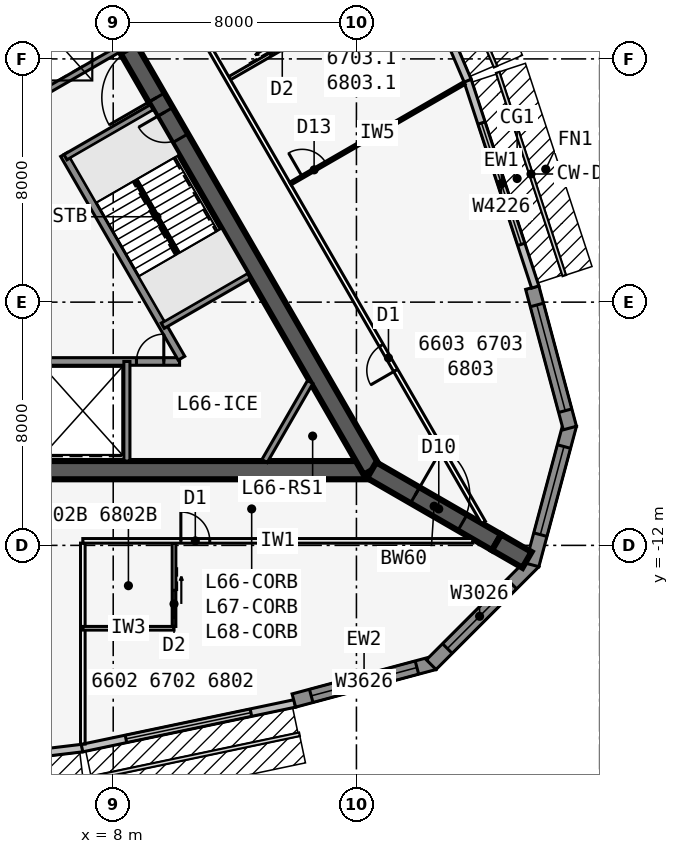
"""IFC4 building model, lengths in metres.
Left out: names, types, materials, properties, quantities, classifications, styles, units other than length and angle.
Written with IfcOpenShell. Run it as: python <this file> out.ifc"""

import sys

from ifc_helpers import new_model, si_unit, direction, frame, frame_2d, origin, place, context, subcontext, project, spatial, polyline, rectangle, outline, extrude, element, fill, save


model = new_model("IFC4")
c1 = context("Model", 3, precision=1e-05, world=origin(), true_north=direction((0.0, 1.0)))
c2 = subcontext(c1, "Body", "Model", "MODEL_VIEW")
j1 = project(units=[si_unit("LENGTHUNIT", "METRE"), si_unit("PLANEANGLEUNIT", "RADIAN")], contexts=[c1])
p1 = place(None, origin())
s1 = spatial("IfcSite", under=j1, at=p1, CompositionType="ELEMENT")
p2 = place(p1, origin())
s2 = spatial("IfcBuilding", under=s1, at=p2, CompositionType="ELEMENT")
p3 = place(p2, frame((0.0, 0.0, 250.1)))
s3 = spatial("IfcBuildingStorey", under=s2, at=p3, CompositionType="ELEMENT", Elevation=250.1)
p4 = place(p3, frame((-16.5, -9.526, 0.0), z_axis=(0.0, 0.0, 1.0), x_axis=(1.0, 0.0, 0.0)))
e1 = element("IfcWall", 1, at=p4, inside=s3, PredefinedType="SHEAR", context=c2, shape_type="SweptSolid", body=[
    extrude(rectangle(XDim=33.0, YDim=0.6, at=frame_2d((16.5, 0.0))), origin(), (0.0, 0.0, 1.0), 3.6),
])
p5 = place(p4, frame((14.05, 0.0, 0.0)))
e2 = element("IfcOpeningElement", 2, at=p5, cuts=e1, PredefinedType="OPENING", context=c2, shape_type="SweptSolid", body=[
    extrude(rectangle(XDim=1.8, YDim=2.13, at=frame_2d((0.9, 1.065))), frame((0.0, 0.31, 0.0), z_axis=(0.0, -1.0, 0.0), x_axis=(1.0, 0.0, 0.0)), (0.0, 0.0, 1.0), 0.62),
])
p6 = place(p3, frame((-0.55, -5.951, 0.0), z_axis=(0.0, 0.0, 1.0), x_axis=(1.0, 0.0, 0.0)))
e3 = element("IfcWall", 3, at=p6, inside=s3, PredefinedType="SOLIDWALL", context=c2, shape_type="SweptSolid", body=[
    extrude(rectangle(XDim=10.733, YDim=0.25, at=frame_2d((5.366, 0.0))), origin(), (0.0, 0.0, 1.0), 3.435),
])
p7 = place(p6, frame((9.314, 0.0, 0.0)))
e4 = element("IfcOpeningElement", 4, at=p7, cuts=e3, PredefinedType="OPENING", context=c2, shape_type="SweptSolid", body=[
    extrude(rectangle(XDim=0.9, YDim=2.13, at=frame_2d((0.45, 1.065))), frame((0.0, 0.135, 0.0), z_axis=(0.0, -1.0, 0.0), x_axis=(1.0, 0.0, 0.0)), (0.0, 0.0, 1.0), 0.27),
])
p8 = place(p6, frame((1.05, 0.0, 0.0)))
e5 = element("IfcOpeningElement", 5, at=p8, cuts=e3, PredefinedType="OPENING", context=c2, shape_type="SweptSolid", body=[
    extrude(rectangle(XDim=1.1, YDim=2.13, at=frame_2d((0.55, 1.065))), frame((0.0, 0.135, 0.0), z_axis=(0.0, -1.0, 0.0), x_axis=(1.0, 0.0, 0.0)), (0.0, 0.0, 1.0), 0.27),
])
p9 = place(p6, frame((4.05, 0.0, 0.0)))
e6 = element("IfcOpeningElement", 6, at=p9, cuts=e3, PredefinedType="OPENING", context=c2, shape_type="SweptSolid", body=[
    extrude(rectangle(XDim=1.1, YDim=2.13, at=frame_2d((0.55, 1.065))), frame((0.0, 0.135, 0.0), z_axis=(0.0, -1.0, 0.0), x_axis=(1.0, 0.0, 0.0)), (0.0, 0.0, 1.0), 0.27),
])
p10 = place(p3, frame((8.45, -5.951, 0.0), z_axis=(0.0, 0.0, 1.0), x_axis=(0.0, -1.0, 0.0)))
e7 = element("IfcWall", 7, at=p10, inside=s3, PredefinedType="SOLIDWALL", context=c2, shape_type="SweptSolid", body=[
    extrude(rectangle(XDim=3.275, YDim=0.2, at=frame_2d((1.637, 0.0))), origin(), (0.0, 0.0, 1.0), 3.435),
])
p11 = place(p3, frame((16.5, -9.526, 0.0), z_axis=(0.0, 0.0, 1.0), x_axis=(-0.499999749417, 0.866025548458, 0.0)))
e8 = element("IfcWall", 8, at=p11, inside=s3, PredefinedType="SHEAR", context=c2, shape_type="SweptSolid", body=[
    extrude(rectangle(XDim=33.0, YDim=0.6, at=frame_2d((16.5, 0.0))), origin(), (0.0, 0.0, 1.0), 3.6),
])
p12 = place(p11, frame((14.15, 0.0, 0.0)))
e9 = element("IfcOpeningElement", 9, at=p12, cuts=e8, PredefinedType="OPENING", context=c2, shape_type="SweptSolid", body=[
    extrude(rectangle(XDim=1.8, YDim=2.13, at=frame_2d((0.9, 1.065))), frame((0.0, 0.31, 0.0), z_axis=(0.0, -1.0, 0.0), x_axis=(1.0, 0.0, 0.0)), (0.0, 0.0, 1.0), 0.62),
])
p13 = place(p11, frame((12.6, 0.0, 0.0)))
e10 = element("IfcOpeningElement", 10, at=p13, cuts=e8, PredefinedType="OPENING", context=c2, shape_type="SweptSolid", body=[
    extrude(rectangle(XDim=1.0, YDim=2.13, at=frame_2d((0.5, 1.065))), frame((0.0, 0.31, 0.0), z_axis=(0.0, -1.0, 0.0), x_axis=(1.0, 0.0, 0.0)), (0.0, 0.0, 1.0), 0.62),
])
p14 = place(p3, frame((10.245, -5.843, 0.0), z_axis=(0.0, 0.0, 1.0), x_axis=(-0.499993009313, 0.866029439822, 0.0)))
e11 = element("IfcWall", 11, at=p14, inside=s3, PredefinedType="SOLIDWALL", context=c2, shape_type="SweptSolid", body=[
    extrude(rectangle(XDim=7.733, YDim=0.25, at=frame_2d((3.866, 0.0))), origin(), (0.0, 0.0, 1.0), 3.435),
])
p15 = place(p3, frame((9.629, -4.775, 0.0), z_axis=(0.0, 0.0, 1.0), x_axis=(0.865995643347, 0.500051543047, 0.0)))
e12 = element("IfcWall", 12, at=p15, inside=s3, PredefinedType="SOLIDWALL", context=c2, shape_type="SweptSolid", body=[
    extrude(rectangle(XDim=3.275, YDim=0.2, at=frame_2d((1.638, 0.0))), origin(), (0.0, 0.0, 1.0), 3.435),
])
for number, where, z_axis, x_axis in (
    (13, (6.429, 0.767, 0.0), (0.0, 0.0, 1.0), (0.866, 0.5, 0.0)),
    (14, (5.329, 2.673, 0.0), (0.0, 0.0, 1.0), (0.866, 0.5, 0.0)),
):
    element("IfcWall", number, at=place(p3, frame(where, z_axis=z_axis, x_axis=x_axis)), inside=s3, PredefinedType="SOLIDWALL", context=c2, shape_type="SweptSolid", body=[
        extrude(rectangle(XDim=3.275, YDim=0.2, at=frame_2d((1.637, 0.0))), origin(), (0.0, 0.0, 1.0), 3.435),
    ])
p16 = place(p3, frame((16.5, -9.526, 0.0), z_axis=(0.0, 0.0, 1.0), x_axis=(0.866031398331, -0.499989616998, 0.0)))
e15 = element("IfcWall", 15, at=p16, inside=s3, PredefinedType="SHEAR", context=c2, shape_type="SweptSolid", body=[
    extrude(rectangle(XDim=4.746, YDim=0.6, at=frame_2d((2.373, 0.0))), origin(), (0.0, 0.0, 1.0), 3.6),
])
p17 = place(p16, frame((1.65, 0.0, 0.0)))
e16 = element("IfcOpeningElement", 16, at=p17, cuts=e15, PredefinedType="OPENING", context=c2, shape_type="SweptSolid", body=[
    extrude(rectangle(XDim=1.8, YDim=2.13, at=frame_2d((0.9, 1.065))), frame((0.0, 0.31, 0.0), z_axis=(0.0, -1.0, 0.0), x_axis=(1.0, 0.0, 0.0)), (0.0, 0.0, 1.0), 0.62),
])
p18 = place(p3, frame((20.61, -11.899, 0.0), z_axis=(0.0, 0.0, 1.0), x_axis=(0.866009537788, -0.500027479704, 0.0)))
e17 = element("IfcWall", 17, at=p18, inside=s3, PredefinedType="SHEAR", context=c2, shape_type="SweptSolid", body=[
    extrude(rectangle(XDim=1.155, YDim=0.6, at=frame_2d((0.577, 0.0))), origin(), (0.0, 0.0, 1.0), 3.6),
])
p19 = place(p3, frame((4.985, -18.906, 0.0), z_axis=(0.0, 0.0, 1.0), x_axis=(0.992877411981, 0.119140441403, 0.0)))
e18 = element("IfcWall", 18, at=p19, inside=s3, PredefinedType="STANDARD", context=c2, shape_type="SweptSolid", body=[
    extrude(rectangle(XDim=2.014, YDim=0.25, at=frame_2d((1.007, 0.0))), origin(), (0.0, 0.0, 1.0), 3.435),
])
p20 = place(p3, frame((6.974, -18.668, 0.0), z_axis=(0.0, 0.0, 1.0), x_axis=(0.978654320409, 0.205513311355, 0.0)))
e19 = element("IfcWall", 19, at=p20, inside=s3, PredefinedType="STANDARD", context=c2, shape_type="SweptSolid", body=[
    extrude(rectangle(XDim=7.153, YDim=0.25, at=frame_2d((3.576, 0.0))), origin(), (0.0, 0.0, 1.0), 3.435),
])
p21 = place(p20, frame((1.476, 0.0, 0.45)))
e20 = element("IfcOpeningElement", 20, at=p21, cuts=e19, PredefinedType="OPENING", context=c2, shape_type="SweptSolid", body=[
    extrude(rectangle(XDim=4.2, YDim=2.6, at=frame_2d((2.1, 1.3))), frame((0.0, 0.135, 0.0), z_axis=(0.0, -1.0, 0.0), x_axis=(1.0, 0.0, 0.0)), (0.0, 0.0, 1.0), 0.27),
])
p22 = place(p3, frame((13.942, -17.103, 0.0), z_axis=(0.0, 0.0, 1.0), x_axis=(0.965913862671, 0.258863689806, 0.0)))
e21 = element("IfcWall", 21, at=p22, inside=s3, PredefinedType="SOLIDWALL", context=c2, shape_type="SweptSolid", body=[
    extrude(rectangle(XDim=4.782, YDim=0.45, at=frame_2d((2.391, 0.0))), origin(), (0.0, 0.0, 1.0), 3.435),
])
p23 = place(p22, frame((0.591, 0.0, 0.45)))
e22 = element("IfcOpeningElement", 22, at=p23, cuts=e21, PredefinedType="OPENING", context=c2, shape_type="SweptSolid", body=[
    extrude(rectangle(XDim=3.6, YDim=2.6, at=frame_2d((1.8, 1.3))), frame((0.0, 0.235, 0.0), z_axis=(0.0, -1.0, 0.0), x_axis=(1.0, 0.0, 0.0)), (0.0, 0.0, 1.0), 0.47),
])
p24 = place(p3, frame((18.46, -15.924, 0.0), z_axis=(0.0, 0.0, 1.0), x_axis=(0.707081252484, 0.707132308968, 0.0)))
e23 = element("IfcWall", 23, at=p24, inside=s3, PredefinedType="SOLIDWALL", context=c2, shape_type="SweptSolid", body=[
    extrude(outline(polyline([(4.782, 0.225), (4.723, 0.225), (4.375, 0.132), (4.351, 0.225), (0.0, 0.225), (0.0, -0.225), (4.782, -0.225), (4.782, 0.225)])), origin(), (0.0, 0.0, 1.0), 3.435),
])
p25 = place(p24, frame((0.75, 0.0, 0.45)))
e24 = element("IfcOpeningElement", 24, at=p25, cuts=e23, PredefinedType="OPENING", context=c2, shape_type="SweptSolid", body=[
    extrude(rectangle(XDim=3.0, YDim=2.6, at=frame_2d((1.5, 1.3))), frame((0.0, 0.235, 0.0), z_axis=(0.0, -1.0, 0.0), x_axis=(1.0, 0.0, 0.0)), (0.0, 0.0, 1.0), 0.47),
])
p26 = place(p3, frame((21.783, -12.644, 0.0), z_axis=(0.0, 0.0, 1.0), x_axis=(0.25880328844, 0.965930048136, 0.0)))
e25 = element("IfcWall", 25, at=p26, inside=s3, PredefinedType="SOLIDWALL", context=c2, shape_type="SweptSolid", body=[
    extrude(outline(polyline([(4.782, 0.225), (0.431, 0.225), (0.406, 0.132), (0.06, 0.225), (0.0, 0.225), (0.0, -0.225), (4.782, -0.225), (4.782, 0.225)])), origin(), (0.0, 0.0, 1.0), 3.435),
])
p27 = place(p26, frame((1.031, 0.0, 0.45)))
e26 = element("IfcOpeningElement", 26, at=p27, cuts=e25, PredefinedType="OPENING", context=c2, shape_type="SweptSolid", body=[
    extrude(rectangle(XDim=3.0, YDim=2.6, at=frame_2d((1.5, 1.3))), frame((0.0, 0.235, 0.0), z_axis=(0.0, -1.0, 0.0), x_axis=(1.0, 0.0, 0.0)), (0.0, 0.0, 1.0), 0.47),
])
p28 = place(p3, frame((23.02, -8.141, 0.0), z_axis=(0.0, 0.0, 1.0), x_axis=(-0.25880328844, 0.965930048136, 0.0)))
e27 = element("IfcWall", 27, at=p28, inside=s3, PredefinedType="SOLIDWALL", context=c2, shape_type="SweptSolid", body=[
    extrude(rectangle(XDim=4.782, YDim=0.45, at=frame_2d((2.391, 0.0))), origin(), (0.0, 0.0, 1.0), 3.435),
])
p29 = place(p28, frame((0.591, 0.0, 0.45)))
e28 = element("IfcOpeningElement", 28, at=p29, cuts=e27, PredefinedType="OPENING", context=c2, shape_type="SweptSolid", body=[
    extrude(rectangle(XDim=3.6, YDim=2.6, at=frame_2d((1.8, 1.3))), frame((0.0, 0.235, 0.0), z_axis=(0.0, -1.0, 0.0), x_axis=(1.0, 0.0, 0.0)), (0.0, 0.0, 1.0), 0.47),
])
p30 = place(p3, frame((21.881, -3.503, 0.0), z_axis=(0.0, 0.0, 1.0), x_axis=(-0.311328857048, 0.95030223759, 0.0)))
e29 = element("IfcWall", 29, at=p30, inside=s3, PredefinedType="STANDARD", context=c2, shape_type="SweptSolid", body=[
    extrude(rectangle(XDim=7.153, YDim=0.25, at=frame_2d((3.576, 0.0))), origin(), (0.0, 0.0, 1.0), 3.435),
])
p31 = place(p30, frame((1.476, 0.0, 0.45)))
e30 = element("IfcOpeningElement", 30, at=p31, cuts=e29, PredefinedType="OPENING", context=c2, shape_type="SweptSolid", body=[
    extrude(rectangle(XDim=4.2, YDim=2.6, at=frame_2d((2.1, 1.3))), frame((0.0, 0.135, 0.0), z_axis=(0.0, -1.0, 0.0), x_axis=(1.0, 0.0, 0.0)), (0.0, 0.0, 1.0), 0.27),
])
p32 = place(p3, frame((19.658, 3.284, 0.0), z_axis=(0.0, 0.0, 1.0), x_axis=(-0.393290226175, 0.91941437774, 0.0)))
e31 = element("IfcWall", 31, at=p32, inside=s3, PredefinedType="STANDARD", context=c2, shape_type="SweptSolid", body=[
    extrude(rectangle(XDim=2.014, YDim=0.25, at=frame_2d((1.007, 0.0))), origin(), (0.0, 0.0, 1.0), 3.435),
])
p33 = place(p3, frame((7.0, -11.851, 0.0), z_axis=(0.0, 0.0, 1.0), x_axis=(1.0, 0.0, 0.0)))
e32 = element("IfcWall", 32, at=p33, inside=s3, PredefinedType="PARTITIONING", context=c2, shape_type="SweptSolid", body=[
    extrude(rectangle(XDim=12.827, YDim=0.15, at=frame_2d((6.414, 0.0))), origin(), (0.0, 0.0, 1.0), 3.435),
])
p34 = place(p33, frame((3.225, 0.0, 0.0)))
e33 = element("IfcOpeningElement", 33, at=p34, cuts=e32, PredefinedType="OPENING", context=c2, shape_type="SweptSolid", body=[
    extrude(rectangle(XDim=0.95, YDim=2.13, at=frame_2d((0.475, 1.065))), frame((0.0, 0.085, 0.0), z_axis=(0.0, -1.0, 0.0), x_axis=(1.0, 0.0, 0.0)), (0.0, 0.0, 1.0), 0.17),
])
p35 = place(p3, frame((7.0, -11.926, 0.0), z_axis=(0.0, 0.0, 1.0), x_axis=(0.0, -1.0, 0.0)))
e34 = element("IfcWall", 34, at=p35, inside=s3, PredefinedType="PARTITIONING", context=c2, shape_type="SweptSolid", body=[
    extrude(rectangle(XDim=6.609, YDim=0.15, at=frame_2d((3.304, 0.0))), origin(), (0.0, 0.0, 1.0), 2.678),
])
p36 = place(p3, frame((7.0, -14.726, 0.0), z_axis=(0.0, 0.0, 1.0), x_axis=(1.0, 0.0, 0.0)))
e35 = element("IfcWall", 35, at=p36, inside=s3, PredefinedType="PLUMBINGWALL", context=c2, shape_type="SweptSolid", body=[
    extrude(rectangle(XDim=3.0, YDim=0.12, at=frame_2d((1.5, 0.0))), origin(), (0.0, 0.0, 1.0), 3.435),
])
p37 = place(p3, frame((10.0, -11.926, 0.0), z_axis=(0.0, 0.0, 1.0), x_axis=(0.0, -1.0, 0.0)))
e36 = element("IfcWall", 36, at=p37, inside=s3, PredefinedType="PLUMBINGWALL", context=c2, shape_type="SweptSolid", body=[
    extrude(rectangle(XDim=2.74, YDim=0.12, at=frame_2d((1.37, 0.0))), origin(), (0.0, 0.0, 1.0), 3.435),
])
p38 = place(p37, frame((1.55, 0.0, 0.0)))
e37 = element("IfcOpeningElement", 37, at=p38, cuts=e36, PredefinedType="OPENING", context=c2, shape_type="SweptSolid", body=[
    extrude(rectangle(XDim=0.9, YDim=2.13, at=frame_2d((0.45, 1.065))), frame((0.0, 0.07, 0.0), z_axis=(0.0, -1.0, 0.0), x_axis=(1.0, 0.0, 0.0)), (0.0, 0.0, 1.0), 0.14),
])
p39 = place(p3, frame((20.177, -11.245, 0.0), z_axis=(0.0, 0.0, 1.0), x_axis=(-0.499998875317, 0.866026053119, 0.0)))
e38 = element("IfcWall", 38, at=p39, inside=s3, PredefinedType="PARTITIONING", context=c2, shape_type="SweptSolid", body=[
    extrude(rectangle(XDim=39.654, YDim=0.15, at=frame_2d((19.827, 0.0))), origin(), (0.0, 0.0, 1.0), 3.435),
])
p40 = place(p39, frame((5.772, 0.0, 0.0)))
e39 = element("IfcOpeningElement", 39, at=p40, cuts=e38, PredefinedType="OPENING", context=c2, shape_type="SweptSolid", body=[
    extrude(rectangle(XDim=0.95, YDim=2.13, at=frame_2d((0.475, 1.065))), frame((0.0, 0.085, 0.0), z_axis=(0.0, -1.0, 0.0), x_axis=(1.0, 0.0, 0.0)), (0.0, 0.0, 1.0), 0.17),
])
p41 = place(p39, frame((32.932, 0.0, 0.0)))
e40 = element("IfcOpeningElement", 40, at=p41, cuts=e38, PredefinedType="OPENING", context=c2, shape_type="SweptSolid", body=[
    extrude(rectangle(XDim=0.95, YDim=2.13, at=frame_2d((0.475, 1.065))), frame((0.0, 0.085, 0.0), z_axis=(0.0, -1.0, 0.0), x_axis=(1.0, 0.0, 0.0)), (0.0, 0.0, 1.0), 0.17),
])
p42 = place(p3, frame((13.829, -0.099, 0.0), z_axis=(0.0, 0.0, 1.0), x_axis=(0.866022562216, 0.500004921708, 0.0)))
e41 = element("IfcWall", 41, at=p42, inside=s3, PredefinedType="PARTITIONING", context=c2, shape_type="SweptSolid", body=[
    extrude(rectangle(XDim=6.609, YDim=0.1, at=frame_2d((3.304, 0.0))), origin(), (0.0, 0.0, 1.0), 2.678),
])
p43 = place(p42, frame((0.45, 0.0, 0.0)))
e42 = element("IfcOpeningElement", 42, at=p43, cuts=e41, PredefinedType="OPENING", context=c2, shape_type="SweptSolid", body=[
    extrude(rectangle(XDim=0.9, YDim=2.13, at=frame_2d((0.45, 1.065))), frame((0.0, 0.06, 0.0), z_axis=(0.0, -1.0, 0.0), x_axis=(1.0, 0.0, 0.0)), (0.0, 0.0, 1.0), 0.12),
])
p44 = place(p3, frame((11.829, 3.365, 0.0), z_axis=(0.0, 0.0, 1.0), x_axis=(0.865997131366, 0.500048966069, 0.0)))
e43 = element("IfcWall", 43, at=p44, inside=s3, PredefinedType="PLUMBINGWALL", context=c2, shape_type="SweptSolid", body=[
    extrude(rectangle(XDim=2.74, YDim=0.12, at=frame_2d((1.37, 0.0))), origin(), (0.0, 0.0, 1.0), 3.435),
])
p45 = place(p44, frame((1.55, 0.0, 0.0)))
e44 = element("IfcOpeningElement", 44, at=p45, cuts=e43, PredefinedType="OPENING", context=c2, shape_type="SweptSolid", body=[
    extrude(rectangle(XDim=0.9, YDim=2.13, at=frame_2d((0.45, 1.065))), frame((0.0, 0.07, 0.0), z_axis=(0.0, -1.0, 0.0), x_axis=(1.0, 0.0, 0.0)), (0.0, 0.0, 1.0), 0.14),
])
p46 = place(p3, frame((14.479, -6.626, 0.0), z_axis=(0.0, 0.0, 1.0), x_axis=(-0.499952404951, -0.866052881055, 0.0)))
e45 = element("IfcWall", 45, at=p46, inside=s3, PredefinedType="SOLIDWALL", context=c2, shape_type="SweptSolid", body=[
    extrude(rectangle(XDim=3.002, YDim=0.2, at=frame_2d((1.501, 0.0))), origin(), (0.0, 0.0, 1.0), 3.435),
])
p47 = place(p3, frame((10.135, -2.401, 0.0), z_axis=(0.0, 0.0, 1.0), x_axis=(-0.499992232847, 0.866029888106, 0.0)))
e46 = element("IfcWall", 46, at=p47, inside=s3, PredefinedType="SOLIDWALL", context=c2, shape_type="SweptSolid", body=[
    extrude(rectangle(XDim=2.794, YDim=0.1, at=frame_2d((1.397, 0.0))), origin(), (0.0, 0.0, 1.0), 3.6),
])
p48 = place(p21, origin())
e47 = element("IfcWindow", 47, at=p48, inside=s3, PartitioningType="SINGLE_PANEL", PredefinedType="WINDOW", context=c2, shape_type="SweptSolid", body=[
    extrude(rectangle(XDim=4.2, YDim=2.6, at=frame_2d((2.1, 1.3))), frame((0.0, 0.03, 0.0), z_axis=(0.0, -1.0, 0.0), x_axis=(1.0, 0.0, 0.0)), (0.0, 0.0, 1.0), 0.06),
])
fill(e20, e47)
p49 = place(p23, origin())
e48 = element("IfcWindow", 48, at=p49, inside=s3, PartitioningType="SINGLE_PANEL", PredefinedType="WINDOW", context=c2, shape_type="SweptSolid", body=[
    extrude(rectangle(XDim=3.6, YDim=2.6, at=frame_2d((1.8, 1.3))), frame((0.0, 0.03, 0.0), z_axis=(0.0, -1.0, 0.0), x_axis=(1.0, 0.0, 0.0)), (0.0, 0.0, 1.0), 0.06),
])
fill(e22, e48)
p50 = place(p25, origin())
e49 = element("IfcWindow", 49, at=p50, inside=s3, PartitioningType="SINGLE_PANEL", PredefinedType="WINDOW", context=c2, shape_type="SweptSolid", body=[
    extrude(rectangle(XDim=3.0, YDim=2.6, at=frame_2d((1.5, 1.3))), frame((0.0, 0.03, 0.0), z_axis=(0.0, -1.0, 0.0), x_axis=(1.0, 0.0, 0.0)), (0.0, 0.0, 1.0), 0.06),
])
fill(e24, e49)
p51 = place(p27, origin())
e50 = element("IfcWindow", 50, at=p51, inside=s3, PartitioningType="SINGLE_PANEL", PredefinedType="WINDOW", context=c2, shape_type="SweptSolid", body=[
    extrude(rectangle(XDim=3.0, YDim=2.6, at=frame_2d((1.5, 1.3))), frame((0.0, 0.03, 0.0), z_axis=(0.0, -1.0, 0.0), x_axis=(1.0, 0.0, 0.0)), (0.0, 0.0, 1.0), 0.06),
])
fill(e26, e50)
p52 = place(p29, origin())
e51 = element("IfcWindow", 51, at=p52, inside=s3, PartitioningType="SINGLE_PANEL", PredefinedType="WINDOW", context=c2, shape_type="SweptSolid", body=[
    extrude(rectangle(XDim=3.6, YDim=2.6, at=frame_2d((1.8, 1.3))), frame((0.0, 0.03, 0.0), z_axis=(0.0, -1.0, 0.0), x_axis=(1.0, 0.0, 0.0)), (0.0, 0.0, 1.0), 0.06),
])
fill(e28, e51)
p53 = place(p31, origin())
e52 = element("IfcWindow", 52, at=p53, inside=s3, PartitioningType="SINGLE_PANEL", PredefinedType="WINDOW", context=c2, shape_type="SweptSolid", body=[
    extrude(rectangle(XDim=4.2, YDim=2.6, at=frame_2d((2.1, 1.3))), frame((0.0, 0.03, 0.0), z_axis=(0.0, -1.0, 0.0), x_axis=(1.0, 0.0, 0.0)), (0.0, 0.0, 1.0), 0.06),
])
fill(e30, e52)
p54 = place(p38, origin())
e53 = element("IfcDoor", 53, at=p54, inside=s3, OperationType="SLIDING_TO_LEFT", PredefinedType="DOOR", context=c2, shape_type="SweptSolid", body=[
    extrude(rectangle(XDim=0.9, YDim=2.13, at=frame_2d((0.45, 1.065))), frame((0.0, 0.025, 0.0), z_axis=(0.0, -1.0, 0.0), x_axis=(1.0, 0.0, 0.0)), (0.0, 0.0, 1.0), 0.05),
])
fill(e37, e53)
p55 = place(p34, origin())
e54 = element("IfcDoor", 54, at=p55, inside=s3, OperationType="SINGLE_SWING_LEFT", PredefinedType="DOOR", context=c2, shape_type="SweptSolid", body=[
    extrude(rectangle(XDim=0.95, YDim=2.13, at=frame_2d((0.475, 1.065))), frame((0.0, 0.025, 0.0), z_axis=(0.0, -1.0, 0.0), x_axis=(1.0, 0.0, 0.0)), (0.0, 0.0, 1.0), 0.05),
])
fill(e33, e54)
p56 = place(p43, origin())
e55 = element("IfcDoor", 55, at=p56, inside=s3, OperationType="SINGLE_SWING_LEFT", PredefinedType="DOOR", context=c2, shape_type="SweptSolid", body=[
    extrude(rectangle(XDim=0.9, YDim=2.13, at=frame_2d((0.45, 1.065))), frame((0.0, 0.025, 0.0), z_axis=(0.0, -1.0, 0.0), x_axis=(1.0, 0.0, 0.0)), (0.0, 0.0, 1.0), 0.05),
])
fill(e42, e55)
p57 = place(p40, origin())
e56 = element("IfcDoor", 56, at=p57, inside=s3, OperationType="SINGLE_SWING_LEFT", PredefinedType="DOOR", context=c2, shape_type="SweptSolid", body=[
    extrude(rectangle(XDim=0.95, YDim=2.13, at=frame_2d((0.475, 1.065))), frame((0.0, 0.025, 0.0), z_axis=(0.0, -1.0, 0.0), x_axis=(1.0, 0.0, 0.0)), (0.0, 0.0, 1.0), 0.05),
])
fill(e39, e56)
p58 = place(p45, origin())
e57 = element("IfcDoor", 57, at=p58, inside=s3, OperationType="SLIDING_TO_LEFT", PredefinedType="DOOR", context=c2, shape_type="SweptSolid", body=[
    extrude(rectangle(XDim=0.9, YDim=2.13, at=frame_2d((0.45, 1.065))), frame((0.0, 0.025, 0.0), z_axis=(0.0, -1.0, 0.0), x_axis=(1.0, 0.0, 0.0)), (0.0, 0.0, 1.0), 0.05),
])
fill(e44, e57)
p59 = place(p12, origin())
e58 = element("IfcDoor", 58, at=p59, inside=s3, OperationType="DOUBLE_DOOR_SINGLE_SWING", PredefinedType="DOOR", context=c2, shape_type="SweptSolid", body=[
    extrude(rectangle(XDim=1.8, YDim=2.13, at=frame_2d((0.9, 1.065))), frame((0.0, 0.025, 0.0), z_axis=(0.0, -1.0, 0.0), x_axis=(1.0, 0.0, 0.0)), (0.0, 0.0, 1.0), 0.05),
])
fill(e9, e58)
p60 = place(p13, origin())
e59 = element("IfcDoor", 59, at=p60, inside=s3, OperationType="SINGLE_SWING_RIGHT", PredefinedType="DOOR", context=c2, shape_type="SweptSolid", body=[
    extrude(rectangle(XDim=1.0, YDim=2.13, at=frame_2d((0.5, 1.065))), frame((0.0, 0.025, 0.0), z_axis=(0.0, -1.0, 0.0), x_axis=(1.0, 0.0, 0.0)), (0.0, 0.0, 1.0), 0.05),
])
fill(e10, e59)
p61 = place(p17, origin())
e60 = element("IfcDoor", 60, at=p61, inside=s3, OperationType="DOUBLE_DOOR_DOUBLE_SWING", PredefinedType="DOOR", context=c2, shape_type="SweptSolid", body=[
    extrude(rectangle(XDim=1.8, YDim=2.13, at=frame_2d((0.9, 1.065))), frame((0.0, 0.025, 0.0), z_axis=(0.0, -1.0, 0.0), x_axis=(1.0, 0.0, 0.0)), (0.0, 0.0, 1.0), 0.05),
])
fill(e16, e60)
p62 = place(p7, origin())
e61 = element("IfcDoor", 61, at=p62, inside=s3, OperationType="SINGLE_SWING_RIGHT", PredefinedType="DOOR", context=c2, shape_type="SweptSolid", body=[
    extrude(rectangle(XDim=0.9, YDim=2.13, at=frame_2d((0.45, 1.065))), frame((0.0, 0.025, 0.0), z_axis=(0.0, -1.0, 0.0), x_axis=(1.0, 0.0, 0.0)), (0.0, 0.0, 1.0), 0.05),
])
fill(e4, e61)
save(model, sys.argv[1])
